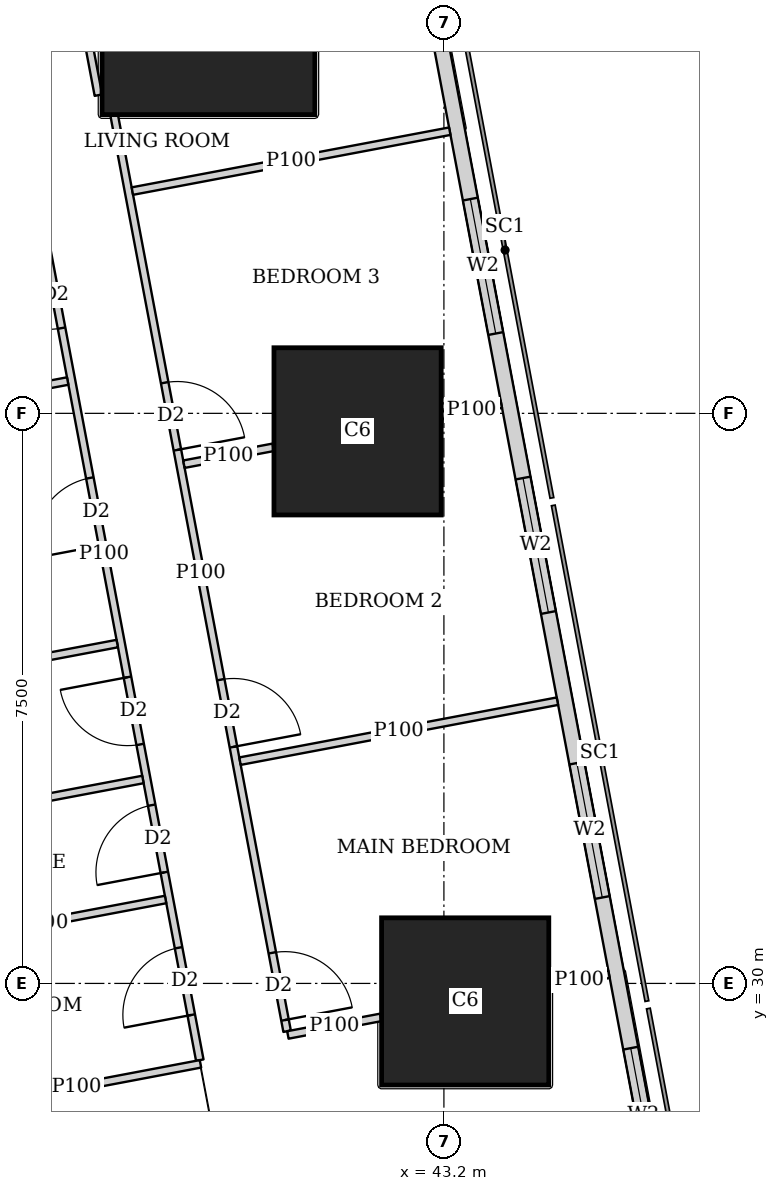
"""IFC4 building model, lengths in metres.
Left out: names, types, materials, properties, quantities, classifications, styles, units other than length and angle.
Written with IfcOpenShell. Run it as: python <this file> out.ifc"""

import sys

from ifc_helpers import new_model, si_unit, direction, frame, frame_2d, origin, origin_2d, place, context, subcontext, project, spatial, rectangle, extrude, element, fill, save


model = new_model("IFC4")
c1 = context("Model", 3, precision=1e-05, world=origin(), true_north=direction((0.0, 1.0)))
c2 = subcontext(c1, "Body", "Model", "MODEL_VIEW")
j1 = project(units=[si_unit("LENGTHUNIT", "METRE"), si_unit("PLANEANGLEUNIT", "RADIAN")], contexts=[c1])
p1 = place(None, origin())
s1 = spatial("IfcSite", under=j1, at=p1, CompositionType="ELEMENT")
p2 = place(p1, origin())
s2 = spatial("IfcBuilding", under=s1, at=p2, CompositionType="ELEMENT")
p3 = place(p2, frame((0.0, 0.0, 81.65)))
s3 = spatial("IfcBuildingStorey", under=s2, at=p3, CompositionType="ELEMENT", Elevation=81.65)
for number, where, z_axis, x_axis in (
    (1, (43.48, 29.763, 0.0), (0.0, 0.0, 1.0), (1.0, 0.0, 0.0)),
    (2, (42.064, 37.263, 0.0), (0.0, 0.0, 1.0), (1.0, 0.0, 0.0)),
):
    element("IfcColumn", number, at=place(p3, frame(where, z_axis=z_axis, x_axis=x_axis)), inside=s3, PredefinedType="COLUMN", context=c2, shape_type="SweptSolid", body=[
        extrude(rectangle(XDim=2.2, YDim=2.2, at=origin_2d()), origin(), (0.0, 0.0, 1.0), 3.75),
    ])
p4 = place(p3, frame((40.102, 42.83, 0.0), z_axis=(0.0, 0.0, 1.0), x_axis=(1.0, 0.0, 0.0)))
e3 = element("IfcColumn", 3, at=p4, inside=s3, PredefinedType="COLUMN", context=c2, shape_type="SweptSolid", body=[
    extrude(rectangle(XDim=2.8, YDim=2.8, at=origin_2d()), origin(), (0.0, 0.0, 1.0), 3.75),
])
p5 = place(p3, frame((50.653, 2.703, 0.0), z_axis=(0.0, 0.0, 1.0), x_axis=(-0.185612026696, 0.982623109613, 0.0)))
e4 = element("IfcWall", 4, at=p5, inside=s3, PredefinedType="SOLIDWALL", context=c2, shape_type="SweptSolid", body=[
    extrude(rectangle(XDim=41.393, YDim=0.2, at=frame_2d((20.697, 0.0))), origin(), (0.0, 0.0, 1.0), 3.5),
])
p6 = place(p5, frame((1.633, 0.0, 0.9)))
e5 = element("IfcOpeningElement", 5, at=p6, cuts=e4, PredefinedType="OPENING", context=c2, shape_type="SweptSolid", body=[
    extrude(rectangle(XDim=1.8, YDim=1.5, at=frame_2d((0.9, 0.75))), frame((0.0, 0.11, 0.0), z_axis=(0.0, -1.0, 0.0), x_axis=(1.0, 0.0, 0.0)), (0.0, 0.0, 1.0), 0.22),
])
p7 = place(p5, frame((6.032, 0.0, 0.9)))
e6 = element("IfcOpeningElement", 6, at=p7, cuts=e4, PredefinedType="OPENING", context=c2, shape_type="SweptSolid", body=[
    extrude(rectangle(XDim=1.8, YDim=1.5, at=frame_2d((0.9, 0.75))), frame((0.0, 0.11, 0.0), z_axis=(0.0, -1.0, 0.0), x_axis=(1.0, 0.0, 0.0)), (0.0, 0.0, 1.0), 0.22),
])
p8 = place(p5, frame((9.848, 0.0, 0.9)))
e7 = element("IfcOpeningElement", 7, at=p8, cuts=e4, PredefinedType="OPENING", context=c2, shape_type="SweptSolid", body=[
    extrude(rectangle(XDim=1.8, YDim=1.5, at=frame_2d((0.9, 0.75))), frame((0.0, 0.11, 0.0), z_axis=(0.0, -1.0, 0.0), x_axis=(1.0, 0.0, 0.0)), (0.0, 0.0, 1.0), 0.22),
])
p9 = place(p5, frame((13.664, 0.0, 0.9)))
e8 = element("IfcOpeningElement", 8, at=p9, cuts=e4, PredefinedType="OPENING", context=c2, shape_type="SweptSolid", body=[
    extrude(rectangle(XDim=1.8, YDim=1.5, at=frame_2d((0.9, 0.75))), frame((0.0, 0.11, 0.0), z_axis=(0.0, -1.0, 0.0), x_axis=(1.0, 0.0, 0.0)), (0.0, 0.0, 1.0), 0.22),
])
p10 = place(p5, frame((17.481, 0.0, 0.9)))
e9 = element("IfcOpeningElement", 9, at=p10, cuts=e4, PredefinedType="OPENING", context=c2, shape_type="SweptSolid", body=[
    extrude(rectangle(XDim=1.8, YDim=1.5, at=frame_2d((0.9, 0.75))), frame((0.0, 0.11, 0.0), z_axis=(0.0, -1.0, 0.0), x_axis=(1.0, 0.0, 0.0)), (0.0, 0.0, 1.0), 0.22),
])
p11 = place(p5, frame((21.297, 0.0, 0.9)))
e10 = element("IfcOpeningElement", 10, at=p11, cuts=e4, PredefinedType="OPENING", context=c2, shape_type="SweptSolid", body=[
    extrude(rectangle(XDim=1.8, YDim=1.5, at=frame_2d((0.9, 0.75))), frame((0.0, 0.11, 0.0), z_axis=(0.0, -1.0, 0.0), x_axis=(1.0, 0.0, 0.0)), (0.0, 0.0, 1.0), 0.22),
])
p12 = place(p5, frame((25.113, 0.0, 0.9)))
e11 = element("IfcOpeningElement", 11, at=p12, cuts=e4, PredefinedType="OPENING", context=c2, shape_type="SweptSolid", body=[
    extrude(rectangle(XDim=1.8, YDim=1.5, at=frame_2d((0.9, 0.75))), frame((0.0, 0.11, 0.0), z_axis=(0.0, -1.0, 0.0), x_axis=(1.0, 0.0, 0.0)), (0.0, 0.0, 1.0), 0.22),
])
p13 = place(p5, frame((28.93, 0.0, 0.9)))
e12 = element("IfcOpeningElement", 12, at=p13, cuts=e4, PredefinedType="OPENING", context=c2, shape_type="SweptSolid", body=[
    extrude(rectangle(XDim=1.8, YDim=1.5, at=frame_2d((0.9, 0.75))), frame((0.0, 0.11, 0.0), z_axis=(0.0, -1.0, 0.0), x_axis=(1.0, 0.0, 0.0)), (0.0, 0.0, 1.0), 0.22),
])
p14 = place(p5, frame((32.746, 0.0, 0.9)))
e13 = element("IfcOpeningElement", 13, at=p14, cuts=e4, PredefinedType="OPENING", context=c2, shape_type="SweptSolid", body=[
    extrude(rectangle(XDim=1.8, YDim=1.5, at=frame_2d((0.9, 0.75))), frame((0.0, 0.11, 0.0), z_axis=(0.0, -1.0, 0.0), x_axis=(1.0, 0.0, 0.0)), (0.0, 0.0, 1.0), 0.22),
])
p15 = place(p5, frame((36.481, 0.0, 0.9)))
e14 = element("IfcOpeningElement", 14, at=p15, cuts=e4, PredefinedType="OPENING", context=c2, shape_type="SweptSolid", body=[
    extrude(rectangle(XDim=1.8, YDim=1.5, at=frame_2d((0.9, 0.75))), frame((0.0, 0.11, 0.0), z_axis=(0.0, -1.0, 0.0), x_axis=(1.0, 0.0, 0.0)), (0.0, 0.0, 1.0), 0.22),
])
p16 = place(p3, frame((33.382, 45.65, 0.0), z_axis=(0.0, 0.0, 1.0), x_axis=(0.185593544777, -0.982626600565, 0.0)))
e15 = element("IfcWall", 15, at=p16, inside=s3, PredefinedType="SOLIDWALL", context=c2, shape_type="SweptSolid", body=[
    extrude(rectangle(XDim=47.118, YDim=0.15, at=frame_2d((23.559, 0.0))), origin(), (0.0, 0.0, 1.0), 2.2),
])
p17 = place(p16, frame((19.054, 0.0, 0.0)))
e16 = element("IfcOpeningElement", 16, at=p17, cuts=e15, PredefinedType="OPENING", context=c2, shape_type="SweptSolid", body=[
    extrude(rectangle(XDim=1.0, YDim=2.1, at=frame_2d((0.5, 1.05))), frame((0.0, 0.085, 0.0), z_axis=(0.0, -1.0, 0.0), x_axis=(1.0, 0.0, 0.0)), (0.0, 0.0, 1.0), 0.17),
])
p18 = place(p16, frame((22.87, 0.0, 0.0)))
e17 = element("IfcOpeningElement", 17, at=p18, cuts=e15, PredefinedType="OPENING", context=c2, shape_type="SweptSolid", body=[
    extrude(rectangle(XDim=1.0, YDim=2.1, at=frame_2d((0.5, 1.05))), frame((0.0, 0.085, 0.0), z_axis=(0.0, -1.0, 0.0), x_axis=(1.0, 0.0, 0.0)), (0.0, 0.0, 1.0), 0.17),
])
p19 = place(p16, frame((33.833, 0.0, 0.0)))
e18 = element("IfcOpeningElement", 18, at=p19, cuts=e15, PredefinedType="OPENING", context=c2, shape_type="SweptSolid", body=[
    extrude(rectangle(XDim=1.0, YDim=2.1, at=frame_2d((0.5, 1.05))), frame((0.0, 0.085, 0.0), z_axis=(0.0, -1.0, 0.0), x_axis=(1.0, 0.0, 0.0)), (0.0, 0.0, 1.0), 0.17),
])
p20 = place(p3, frame((38.654, 41.686, 0.0), z_axis=(0.0, 0.0, 1.0), x_axis=(-0.185676896978, 0.982610853761, 0.0)))
e19 = element("IfcWall", 19, at=p20, inside=s3, PredefinedType="PARTITIONING", context=c2, shape_type="SweptSolid", body=[
    extrude(rectangle(XDim=4.034, YDim=0.1, at=frame_2d((2.017, 0.0))), origin(), (0.0, 0.0, 1.0), 2.05),
])
p21 = place(p3, frame((38.862, 41.42, 0.0), z_axis=(0.0, 0.0, 1.0), x_axis=(0.185529020159, -0.982638785454, 0.0)))
e20 = element("IfcWall", 20, at=p21, inside=s3, PredefinedType="PARTITIONING", context=c2, shape_type="SweptSolid", body=[
    extrude(rectangle(XDim=12.262, YDim=0.1, at=frame_2d((6.131, 0.0))), origin(), (0.0, 0.0, 1.0), 2.5),
])
p22 = place(p21, frame((11.212, 0.0, 0.0)))
e21 = element("IfcOpeningElement", 21, at=p22, cuts=e20, PredefinedType="OPENING", context=c2, shape_type="SweptSolid", body=[
    extrude(rectangle(XDim=0.9, YDim=2.1, at=frame_2d((0.45, 1.05))), frame((0.0, 0.06, 0.0), z_axis=(0.0, -1.0, 0.0), x_axis=(1.0, 0.0, 0.0)), (0.0, 0.0, 1.0), 0.12),
])
p23 = place(p21, frame((7.555, 0.0, 0.0)))
e22 = element("IfcOpeningElement", 22, at=p23, cuts=e20, PredefinedType="OPENING", context=c2, shape_type="SweptSolid", body=[
    extrude(rectangle(XDim=0.9, YDim=2.1, at=frame_2d((0.45, 1.05))), frame((0.0, 0.06, 0.0), z_axis=(0.0, -1.0, 0.0), x_axis=(1.0, 0.0, 0.0)), (0.0, 0.0, 1.0), 0.12),
])
p24 = place(p21, frame((3.579, 0.0, 0.0)))
e23 = element("IfcOpeningElement", 23, at=p24, cuts=e20, PredefinedType="OPENING", context=c2, shape_type="SweptSolid", body=[
    extrude(rectangle(XDim=0.9, YDim=2.1, at=frame_2d((0.45, 1.05))), frame((0.0, 0.06, 0.0), z_axis=(0.0, -1.0, 0.0), x_axis=(1.0, 0.0, 0.0)), (0.0, 0.0, 1.0), 0.12),
])
p25 = place(p3, frame((37.473, 42.309, 0.0), z_axis=(0.0, 0.0, 1.0), x_axis=(0.185570636839, -0.982630927024, 0.0)))
e24 = element("IfcWall", 24, at=p25, inside=s3, PredefinedType="PARTITIONING", context=c2, shape_type="SweptSolid", body=[
    extrude(rectangle(XDim=13.553, YDim=0.1, at=frame_2d((6.777, 0.0))), origin(), (0.0, 0.0, 1.0), 2.5),
])
p26 = place(p25, frame((12.049, 0.0, 0.0)))
e25 = element("IfcOpeningElement", 25, at=p26, cuts=e24, PredefinedType="OPENING", context=c2, shape_type="SweptSolid", body=[
    extrude(rectangle(XDim=0.9, YDim=2.1, at=frame_2d((0.45, 1.05))), frame((0.0, 0.06, 0.0), z_axis=(0.0, -1.0, 0.0), x_axis=(1.0, 0.0, 0.0)), (0.0, 0.0, 1.0), 0.12),
])
p27 = place(p25, frame((8.427, 0.0, 0.0)))
e26 = element("IfcOpeningElement", 26, at=p27, cuts=e24, PredefinedType="OPENING", context=c2, shape_type="SweptSolid", body=[
    extrude(rectangle(XDim=0.9, YDim=2.1, at=frame_2d((0.45, 1.05))), frame((0.0, 0.06, 0.0), z_axis=(0.0, -1.0, 0.0), x_axis=(1.0, 0.0, 0.0)), (0.0, 0.0, 1.0), 0.12),
])
p28 = place(p25, frame((2.853, 0.0, 0.0)))
e27 = element("IfcOpeningElement", 27, at=p28, cuts=e24, PredefinedType="OPENING", context=c2, shape_type="SweptSolid", body=[
    extrude(rectangle(XDim=0.9, YDim=2.1, at=frame_2d((0.45, 1.05))), frame((0.0, 0.06, 0.0), z_axis=(0.0, -1.0, 0.0), x_axis=(1.0, 0.0, 0.0)), (0.0, 0.0, 1.0), 0.12),
])
p29 = place(p25, frame((10.14, 0.0, 0.0)))
e28 = element("IfcOpeningElement", 28, at=p29, cuts=e24, PredefinedType="OPENING", context=c2, shape_type="SweptSolid", body=[
    extrude(rectangle(XDim=0.9, YDim=2.1, at=frame_2d((0.45, 1.05))), frame((0.0, 0.06, 0.0), z_axis=(0.0, -1.0, 0.0), x_axis=(1.0, 0.0, 0.0)), (0.0, 0.0, 1.0), 0.12),
])
p30 = place(p25, frame((5.759, 0.0, 0.0)))
e29 = element("IfcOpeningElement", 29, at=p30, cuts=e24, PredefinedType="OPENING", context=c2, shape_type="SweptSolid", body=[
    extrude(rectangle(XDim=0.9, YDim=2.1, at=frame_2d((0.45, 1.05))), frame((0.0, 0.06, 0.0), z_axis=(0.0, -1.0, 0.0), x_axis=(1.0, 0.0, 0.0)), (0.0, 0.0, 1.0), 0.12),
])
p31 = place(p3, frame((43.277, 41.212, 0.0), z_axis=(0.0, 0.0, 1.0), x_axis=(-0.982665405803, -0.185387972203, 0.0)))
e30 = element("IfcWall", 30, at=p31, inside=s3, PredefinedType="PARTITIONING", context=c2, shape_type="SweptSolid", body=[
    extrude(rectangle(XDim=4.25, YDim=0.1, at=frame_2d((2.125, 0.0))), origin(), (0.0, 0.0, 1.0), 2.05),
])
p32 = place(p3, frame((43.955, 37.62, 0.0), z_axis=(0.0, 0.0, 1.0), x_axis=(-0.98247004097, -0.186420542316, 0.0)))
e31 = element("IfcWall", 31, at=p32, inside=s3, PredefinedType="PARTITIONING", context=c2, shape_type="SweptSolid", body=[
    extrude(rectangle(XDim=0.795, YDim=0.1, at=frame_2d((0.397, 0.0))), origin(), (0.0, 0.0, 1.0), 2.05),
])
p33 = place(p3, frame((40.954, 37.053, 0.0), z_axis=(0.0, 0.0, 1.0), x_axis=(-0.982628652346, -0.185582681276, 0.0)))
e32 = element("IfcWall", 32, at=p33, inside=s3, PredefinedType="PARTITIONING", context=c2, shape_type="SweptSolid", body=[
    extrude(rectangle(XDim=1.196, YDim=0.1, at=frame_2d((0.598, 0.0))), origin(), (0.0, 0.0, 1.0), 2.05),
])
p34 = place(p3, frame((44.693, 33.713, 0.0), z_axis=(0.0, 0.0, 1.0), x_axis=(-0.982623519589, -0.185609856287, 0.0)))
e33 = element("IfcWall", 33, at=p34, inside=s3, PredefinedType="PARTITIONING", context=c2, shape_type="SweptSolid", body=[
    extrude(rectangle(XDim=4.25, YDim=0.1, at=frame_2d((2.125, 0.0))), origin(), (0.0, 0.0, 1.0), 2.2),
])
p35 = place(p3, frame((45.372, 30.121, 0.0), z_axis=(0.0, 0.0, 1.0), x_axis=(-0.982512656401, -0.186195810938, 0.0)))
e34 = element("IfcWall", 34, at=p35, inside=s3, PredefinedType="PARTITIONING", context=c2, shape_type="SweptSolid", body=[
    extrude(rectangle(XDim=0.796, YDim=0.1, at=frame_2d((0.398, 0.0))), origin(), (0.0, 0.0, 1.0), 3.5),
])
p36 = place(p3, frame((42.37, 29.553, 0.0), z_axis=(0.0, 0.0, 1.0), x_axis=(-0.98263602344, -0.185543648338, 0.0)))
e35 = element("IfcWall", 35, at=p36, inside=s3, PredefinedType="PARTITIONING", context=c2, shape_type="SweptSolid", body=[
    extrude(rectangle(XDim=1.245, YDim=0.1, at=frame_2d((0.623, 0.0))), origin(), (0.0, 0.0, 1.0), 2.5),
])
p37 = place(p3, frame((38.25, 37.925, 0.0), z_axis=(0.0, 0.0, 1.0), x_axis=(-0.982626127294, -0.185596050493, 0.0)))
e36 = element("IfcWall", 36, at=p37, inside=s3, PredefinedType="PARTITIONING", context=c2, shape_type="SweptSolid", body=[
    extrude(rectangle(XDim=1.465, YDim=0.1, at=frame_2d((0.733, 0.0))), origin(), (0.0, 0.0, 1.0), 3.5),
])
p38 = place(p3, frame((39.24, 32.683, 0.0), z_axis=(0.0, 0.0, 1.0), x_axis=(-0.982607026909, -0.185697147715, 0.0)))
e37 = element("IfcWall", 37, at=p38, inside=s3, PredefinedType="PARTITIONING", context=c2, shape_type="SweptSolid", body=[
    extrude(rectangle(XDim=3.275, YDim=0.1, at=frame_2d((1.637, 0.0))), origin(), (0.0, 0.0, 1.0), 3.5),
])
p39 = place(p3, frame((39.997, 28.942, 0.0), z_axis=(0.0, 0.0, 1.0), x_axis=(-0.982569883123, -0.185893584556, 0.0)))
e38 = element("IfcWall", 38, at=p39, inside=s3, PredefinedType="PARTITIONING", context=c2, shape_type="SweptSolid", body=[
    extrude(rectangle(XDim=3.324, YDim=0.1, at=frame_2d((1.662, 0.0))), origin(), (0.0, 0.0, 1.0), 3.5),
])
p40 = place(p3, frame((39.538, 31.104, 0.0), z_axis=(0.0, 0.0, 1.0), x_axis=(-0.982610347627, -0.185679575441, 0.0)))
e39 = element("IfcWall", 39, at=p40, inside=s3, PredefinedType="PARTITIONING", context=c2, shape_type="SweptSolid", body=[
    extrude(rectangle(XDim=3.274, YDim=0.1, at=frame_2d((1.637, 0.0))), origin(), (0.0, 0.0, 1.0), 2.5),
])
p41 = place(p3, frame((38.902, 34.471, 0.0), z_axis=(0.0, 0.0, 1.0), x_axis=(-0.982664729897, -0.18539155487, 0.0)))
e40 = element("IfcWall", 40, at=p41, inside=s3, PredefinedType="PARTITIONING", context=c2, shape_type="SweptSolid", body=[
    extrude(rectangle(XDim=3.274, YDim=0.1, at=frame_2d((1.637, 0.0))), origin(), (0.0, 0.0, 1.0), 3.5),
])
p42 = place(p12, origin())
e41 = element("IfcWindow", 41, at=p42, inside=s3, PartitioningType="SINGLE_PANEL", PredefinedType="WINDOW", context=c2, shape_type="SweptSolid", body=[
    extrude(rectangle(XDim=1.8, YDim=1.5, at=frame_2d((0.9, 0.75))), frame((0.0, 0.03, 0.0), z_axis=(0.0, -1.0, 0.0), x_axis=(1.0, 0.0, 0.0)), (0.0, 0.0, 1.0), 0.06),
])
fill(e11, e41)
p43 = place(p13, origin())
e42 = element("IfcWindow", 42, at=p43, inside=s3, PartitioningType="SINGLE_PANEL", PredefinedType="WINDOW", context=c2, shape_type="SweptSolid", body=[
    extrude(rectangle(XDim=1.8, YDim=1.5, at=frame_2d((0.9, 0.75))), frame((0.0, 0.03, 0.0), z_axis=(0.0, -1.0, 0.0), x_axis=(1.0, 0.0, 0.0)), (0.0, 0.0, 1.0), 0.06),
])
fill(e12, e42)
p44 = place(p14, origin())
e43 = element("IfcWindow", 43, at=p44, inside=s3, PartitioningType="SINGLE_PANEL", PredefinedType="WINDOW", context=c2, shape_type="SweptSolid", body=[
    extrude(rectangle(XDim=1.8, YDim=1.5, at=frame_2d((0.9, 0.75))), frame((0.0, 0.03, 0.0), z_axis=(0.0, -1.0, 0.0), x_axis=(1.0, 0.0, 0.0)), (0.0, 0.0, 1.0), 0.06),
])
fill(e13, e43)
p45 = place(p15, origin())
e44 = element("IfcWindow", 44, at=p45, inside=s3, PartitioningType="SINGLE_PANEL", PredefinedType="WINDOW", context=c2, shape_type="SweptSolid", body=[
    extrude(rectangle(XDim=1.8, YDim=1.5, at=frame_2d((0.9, 0.75))), frame((0.0, 0.03, 0.0), z_axis=(0.0, -1.0, 0.0), x_axis=(1.0, 0.0, 0.0)), (0.0, 0.0, 1.0), 0.06),
])
fill(e14, e44)
p46 = place(p22, origin())
e45 = element("IfcDoor", 45, at=p46, inside=s3, OperationType="SINGLE_SWING_RIGHT", PredefinedType="DOOR", context=c2, shape_type="SweptSolid", body=[
    extrude(rectangle(XDim=0.9, YDim=2.1, at=frame_2d((0.45, 1.05))), frame((0.0, 0.025, 0.0), z_axis=(0.0, -1.0, 0.0), x_axis=(1.0, 0.0, 0.0)), (0.0, 0.0, 1.0), 0.05),
])
fill(e21, e45)
p47 = place(p23, origin())
e46 = element("IfcDoor", 46, at=p47, inside=s3, OperationType="SINGLE_SWING_RIGHT", PredefinedType="DOOR", context=c2, shape_type="SweptSolid", body=[
    extrude(rectangle(XDim=0.9, YDim=2.1, at=frame_2d((0.45, 1.05))), frame((0.0, 0.025, 0.0), z_axis=(0.0, -1.0, 0.0), x_axis=(1.0, 0.0, 0.0)), (0.0, 0.0, 1.0), 0.05),
])
fill(e22, e46)
p48 = place(p24, origin())
e47 = element("IfcDoor", 47, at=p48, inside=s3, OperationType="SINGLE_SWING_RIGHT", PredefinedType="DOOR", context=c2, shape_type="SweptSolid", body=[
    extrude(rectangle(XDim=0.9, YDim=2.1, at=frame_2d((0.45, 1.05))), frame((0.0, 0.025, 0.0), z_axis=(0.0, -1.0, 0.0), x_axis=(1.0, 0.0, 0.0)), (0.0, 0.0, 1.0), 0.05),
])
fill(e23, e47)
p49 = place(p26, origin())
e48 = element("IfcDoor", 48, at=p49, inside=s3, OperationType="SINGLE_SWING_LEFT", PredefinedType="DOOR", context=c2, shape_type="SweptSolid", body=[
    extrude(rectangle(XDim=0.9, YDim=2.1, at=frame_2d((0.45, 1.05))), frame((0.0, 0.025, 0.0), z_axis=(0.0, -1.0, 0.0), x_axis=(1.0, 0.0, 0.0)), (0.0, 0.0, 1.0), 0.05),
])
fill(e25, e48)
p50 = place(p27, origin())
e49 = element("IfcDoor", 49, at=p50, inside=s3, OperationType="SINGLE_SWING_RIGHT", PredefinedType="DOOR", context=c2, shape_type="SweptSolid", body=[
    extrude(rectangle(XDim=0.9, YDim=2.1, at=frame_2d((0.45, 1.05))), frame((0.0, 0.025, 0.0), z_axis=(0.0, -1.0, 0.0), x_axis=(1.0, 0.0, 0.0)), (0.0, 0.0, 1.0), 0.05),
])
fill(e26, e49)
p51 = place(p28, origin())
e50 = element("IfcDoor", 50, at=p51, inside=s3, OperationType="SINGLE_SWING_RIGHT", PredefinedType="DOOR", context=c2, shape_type="SweptSolid", body=[
    extrude(rectangle(XDim=0.9, YDim=2.1, at=frame_2d((0.45, 1.05))), frame((0.0, 0.025, 0.0), z_axis=(0.0, -1.0, 0.0), x_axis=(1.0, 0.0, 0.0)), (0.0, 0.0, 1.0), 0.05),
])
fill(e27, e50)
p52 = place(p29, origin())
e51 = element("IfcDoor", 51, at=p52, inside=s3, OperationType="SINGLE_SWING_LEFT", PredefinedType="DOOR", context=c2, shape_type="SweptSolid", body=[
    extrude(rectangle(XDim=0.9, YDim=2.1, at=frame_2d((0.45, 1.05))), frame((0.0, 0.025, 0.0), z_axis=(0.0, -1.0, 0.0), x_axis=(1.0, 0.0, 0.0)), (0.0, 0.0, 1.0), 0.05),
])
fill(e28, e51)
p53 = place(p30, origin())
e52 = element("IfcDoor", 52, at=p53, inside=s3, OperationType="SINGLE_SWING_LEFT", PredefinedType="DOOR", context=c2, shape_type="SweptSolid", body=[
    extrude(rectangle(XDim=0.9, YDim=2.1, at=frame_2d((0.45, 1.05))), frame((0.0, 0.025, 0.0), z_axis=(0.0, -1.0, 0.0), x_axis=(1.0, 0.0, 0.0)), (0.0, 0.0, 1.0), 0.05),
])
fill(e29, e52)
save(model, sys.argv[1])
